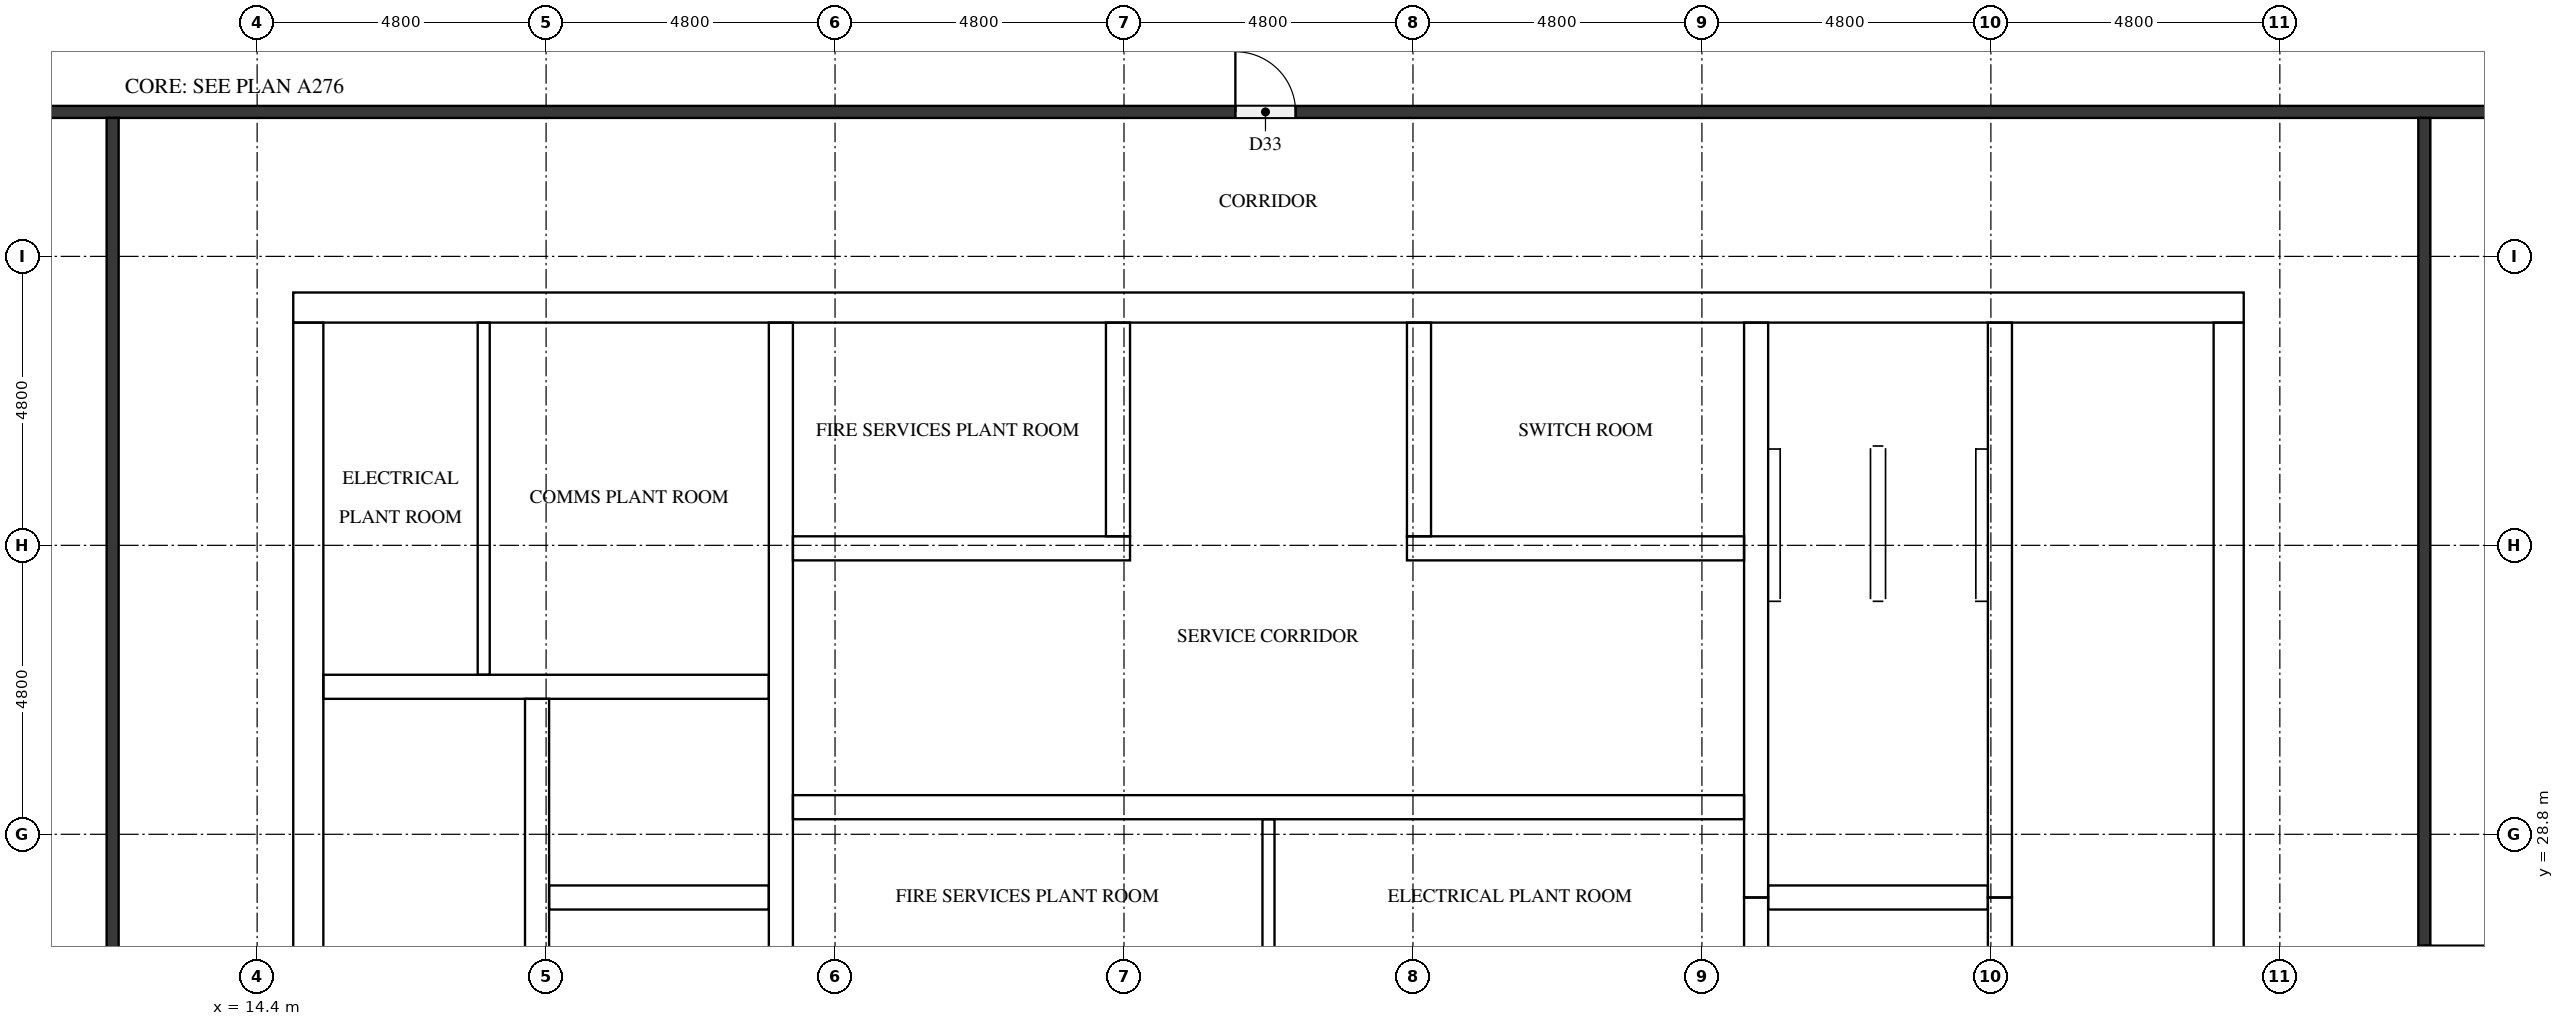
"""IFC4 building model, lengths in metres.
Left out: names, types, materials, properties, quantities, classifications, styles, units other than length and angle.
Written with IfcOpenShell. Run it as: python <this file> out.ifc"""

import sys

from ifc_helpers import new_model, si_unit, direction, frame, frame_2d, origin, place, context, subcontext, project, spatial, rectangle, extrude, element, fill, save


model = new_model("IFC4")
c1 = context("Model", 3, precision=1e-05, world=origin(), true_north=direction((0.0, 1.0)))
c2 = subcontext(c1, "Body", "Model", "MODEL_VIEW")
j1 = project(units=[si_unit("LENGTHUNIT", "METRE"), si_unit("PLANEANGLEUNIT", "RADIAN")], contexts=[c1])
p1 = place(None, origin())
s1 = spatial("IfcSite", under=j1, at=p1, CompositionType="ELEMENT")
p2 = place(p1, origin())
s2 = spatial("IfcBuilding", under=s1, at=p2, CompositionType="ELEMENT")
p3 = place(p2, frame((0.0, 0.0, 314.3)))
s3 = spatial("IfcBuildingStorey", under=s2, at=p3, CompositionType="ELEMENT", Elevation=314.3)
p4 = place(p3, frame((15.0, 37.55, 0.0), z_axis=(0.0, 0.0, 1.0), x_axis=(1.0, 0.0, 0.0)))
e1 = element("IfcWall", 1, at=p4, inside=s3, PredefinedType="SHEAR", context=c2, shape_type="SweptSolid", body=[
    extrude(rectangle(XDim=32.4, YDim=0.5, at=frame_2d((16.2, 0.0))), origin(), (0.0, 0.0, 1.0), 2.6),
])
p5 = place(p4, frame((15.3, 0.0, 0.0)))
e2 = element("IfcOpeningElement", 2, at=p5, cuts=e1, PredefinedType="OPENING", context=c2, shape_type="SweptSolid", body=[
    extrude(rectangle(XDim=1.8, YDim=2.1, at=frame_2d((0.9, 1.05))), frame((0.0, 0.26, 0.0), z_axis=(0.0, -1.0, 0.0), x_axis=(1.0, 0.0, 0.0)), (0.0, 0.0, 1.0), 0.52),
])
p6 = place(p4, frame((1.282, 0.0, 0.0)))
e3 = element("IfcOpeningElement", 3, at=p6, cuts=e1, PredefinedType="OPENING", context=c2, shape_type="SweptSolid", body=[
    extrude(rectangle(XDim=1.0, YDim=2.1, at=frame_2d((0.5, 1.05))), frame((0.0, 0.26, 0.0), z_axis=(0.0, -1.0, 0.0), x_axis=(1.0, 0.0, 0.0)), (0.0, 0.0, 1.0), 0.52),
])
p7 = place(p4, frame((5.082, 0.0, 0.0)))
e4 = element("IfcOpeningElement", 4, at=p7, cuts=e1, PredefinedType="OPENING", context=c2, shape_type="SweptSolid", body=[
    extrude(rectangle(XDim=1.0, YDim=2.1, at=frame_2d((0.5, 1.05))), frame((0.0, 0.26, 0.0), z_axis=(0.0, -1.0, 0.0), x_axis=(1.0, 0.0, 0.0)), (0.0, 0.0, 1.0), 0.52),
])
p8 = place(p3, frame((15.25, 15.5, 0.0), z_axis=(0.0, 0.0, 1.0), x_axis=(0.0, 1.0, 0.0)))
e5 = element("IfcWall", 5, at=p8, inside=s3, PredefinedType="SHEAR", context=c2, shape_type="SweptSolid", body=[
    extrude(rectangle(XDim=21.8, YDim=0.5, at=frame_2d((10.9, 0.0))), origin(), (0.0, 0.0, 1.0), 2.6),
])
p9 = place(p8, frame((5.26, 0.0, 0.0)))
e6 = element("IfcOpeningElement", 6, at=p9, cuts=e5, PredefinedType="OPENING", context=c2, shape_type="SweptSolid", body=[
    extrude(rectangle(XDim=1.2, YDim=2.1, at=frame_2d((0.6, 1.05))), frame((0.0, 0.26, 0.0), z_axis=(0.0, -1.0, 0.0), x_axis=(1.0, 0.0, 0.0)), (0.0, 0.0, 1.0), 0.52),
])
p10 = place(p3, frame((47.15, 15.5, 0.0), z_axis=(0.0, 0.0, 1.0), x_axis=(0.0, 1.0, 0.0)))
e7 = element("IfcWall", 7, at=p10, inside=s3, PredefinedType="SHEAR", context=c2, shape_type="SweptSolid", body=[
    extrude(rectangle(XDim=21.8, YDim=0.5, at=frame_2d((10.9, 0.0))), origin(), (0.0, 0.0, 1.0), 2.6),
])
p11 = place(p10, frame((10.6, 0.0, 0.0)))
e8 = element("IfcOpeningElement", 8, at=p11, cuts=e7, PredefinedType="OPENING", context=c2, shape_type="SweptSolid", body=[
    extrude(rectangle(XDim=1.2, YDim=2.1, at=frame_2d((0.6, 1.05))), frame((0.0, 0.26, 0.0), z_axis=(0.0, -1.0, 0.0), x_axis=(1.0, 0.0, 0.0)), (0.0, 0.0, 1.0), 0.52),
])
p12 = place(p3, frame((19.05, 15.5, 0.0), z_axis=(0.0, 0.0, 1.0), x_axis=(0.0, 1.0, 0.0)))
e9 = element("IfcWall", 9, at=p12, inside=s3, PredefinedType="SHEAR", context=c2, shape_type="SweptSolid", body=[
    extrude(rectangle(XDim=15.55, YDim=0.4, at=frame_2d((7.775, 0.0))), origin(), (0.0, 0.0, 1.0), 2.6),
])
p13 = place(p12, frame((9.95, 0.0, 0.0)))
e10 = element("IfcOpeningElement", 10, at=p13, cuts=e9, PredefinedType="OPENING", context=c2, shape_type="SweptSolid", body=[
    extrude(rectangle(XDim=1.1, YDim=2.1, at=frame_2d((0.55, 1.05))), frame((0.0, 0.21, 0.0), z_axis=(0.0, -1.0, 0.0), x_axis=(1.0, 0.0, 0.0)), (0.0, 0.0, 1.0), 0.42),
])
p14 = place(p12, frame((13.45, 0.0, 0.0)))
e11 = element("IfcOpeningElement", 11, at=p14, cuts=e9, PredefinedType="OPENING", context=c2, shape_type="SweptSolid", body=[
    extrude(rectangle(XDim=1.1, YDim=2.1, at=frame_2d((0.55, 1.05))), frame((0.0, 0.21, 0.0), z_axis=(0.0, -1.0, 0.0), x_axis=(1.0, 0.0, 0.0)), (0.0, 0.0, 1.0), 0.42),
])
p15 = place(p12, frame((0.7, 0.0, 0.0)))
e12 = element("IfcOpeningElement", 12, at=p15, cuts=e9, PredefinedType="OPENING", context=c2, shape_type="SweptSolid", body=[
    extrude(rectangle(XDim=1.2, YDim=2.1, at=frame_2d((0.6, 1.05))), frame((0.0, 0.21, 0.0), z_axis=(0.0, -1.0, 0.0), x_axis=(1.0, 0.0, 0.0)), (0.0, 0.0, 1.0), 0.42),
])
p16 = place(p3, frame((23.1, 15.5, 0.0), z_axis=(0.0, 0.0, 1.0), x_axis=(0.0, 1.0, 0.0)))
e13 = element("IfcWall", 13, at=p16, inside=s3, PredefinedType="SHEAR", context=c2, shape_type="SweptSolid", body=[
    extrude(rectangle(XDim=21.8, YDim=0.4, at=frame_2d((10.9, 0.0))), origin(), (0.0, 0.0, 1.0), 2.6),
])
p17 = place(p3, frame((39.3, 24.25, 0.0), z_axis=(0.0, 0.0, 1.0), x_axis=(0.0, 1.0, 0.0)))
e14 = element("IfcWall", 14, at=p17, inside=s3, PredefinedType="SHEAR", context=c2, shape_type="SweptSolid", body=[
    extrude(rectangle(XDim=3.5, YDim=0.4, at=frame_2d((1.75, 0.0))), origin(), (0.0, 0.0, 1.0), 2.6),
])
p18 = place(p3, frame((39.3, 27.75, 0.0), z_axis=(0.0, 0.0, 1.0), x_axis=(0.0, 1.0, 0.0)))
e15 = element("IfcWall", 15, at=p18, inside=s3, PredefinedType="SHEAR", context=c2, shape_type="SweptSolid", body=[
    extrude(rectangle(XDim=9.55, YDim=0.4, at=frame_2d((4.775, 0.0))), origin(), (0.0, 0.0, 1.0), 2.6),
])
p19 = place(p3, frame((43.35, 24.25, 0.0), z_axis=(0.0, 0.0, 1.0), x_axis=(0.0, 1.0, 0.0)))
e16 = element("IfcWall", 16, at=p19, inside=s3, PredefinedType="SHEAR", context=c2, shape_type="SweptSolid", body=[
    extrude(rectangle(XDim=3.5, YDim=0.4, at=frame_2d((1.75, 0.0))), origin(), (0.0, 0.0, 1.0), 2.6),
])
p20 = place(p19, frame((1.2, 0.0, 0.0)))
e17 = element("IfcOpeningElement", 17, at=p20, cuts=e16, PredefinedType="OPENING", context=c2, shape_type="SweptSolid", body=[
    extrude(rectangle(XDim=1.1, YDim=2.1, at=frame_2d((0.55, 1.05))), frame((0.0, 0.21, 0.0), z_axis=(0.0, -1.0, 0.0), x_axis=(1.0, 0.0, 0.0)), (0.0, 0.0, 1.0), 0.42),
])
p21 = place(p3, frame((43.35, 27.75, 0.0), z_axis=(0.0, 0.0, 1.0), x_axis=(0.0, 1.0, 0.0)))
e18 = element("IfcWall", 18, at=p21, inside=s3, PredefinedType="SHEAR", context=c2, shape_type="SweptSolid", body=[
    extrude(rectangle(XDim=9.55, YDim=0.4, at=frame_2d((4.775, 0.0))), origin(), (0.0, 0.0, 1.0), 2.6),
])
p22 = place(p21, frame((7.65, 0.0, 0.0)))
e19 = element("IfcOpeningElement", 19, at=p22, cuts=e18, PredefinedType="OPENING", context=c2, shape_type="SweptSolid", body=[
    extrude(rectangle(XDim=1.2, YDim=2.1, at=frame_2d((0.6, 1.05))), frame((0.0, 0.21, 0.0), z_axis=(0.0, -1.0, 0.0), x_axis=(1.0, 0.0, 0.0)), (0.0, 0.0, 1.0), 0.42),
])
p23 = place(p3, frame((19.25, 27.75, 0.0), z_axis=(0.0, 0.0, 1.0), x_axis=(1.0, 0.0, 0.0)))
e20 = element("IfcWall", 20, at=p23, inside=s3, PredefinedType="SHEAR", context=c2, shape_type="SweptSolid", body=[
    extrude(rectangle(XDim=3.65, YDim=0.4, at=frame_2d((1.825, 0.0))), origin(), (0.0, 0.0, 1.0), 2.6),
])
p24 = place(p3, frame((15.5, 31.25, 0.0), z_axis=(0.0, 0.0, 1.0), x_axis=(1.0, 0.0, 0.0)))
e21 = element("IfcWall", 21, at=p24, inside=s3, PredefinedType="SHEAR", context=c2, shape_type="SweptSolid", body=[
    extrude(rectangle(XDim=7.4, YDim=0.4, at=frame_2d((3.7, 0.0))), origin(), (0.0, 0.0, 1.0), 2.6),
])
p25 = place(p3, frame((39.5, 27.75, 0.0), z_axis=(0.0, 0.0, 1.0), x_axis=(1.0, 0.0, 0.0)))
e22 = element("IfcWall", 22, at=p25, inside=s3, PredefinedType="SHEAR", context=c2, shape_type="SweptSolid", body=[
    extrude(rectangle(XDim=3.65, YDim=0.4, at=frame_2d((1.825, 0.0))), origin(), (0.0, 0.0, 1.0), 2.6),
])
p26 = place(p3, frame((23.3, 29.25, 0.0), z_axis=(0.0, 0.0, 1.0), x_axis=(1.0, 0.0, 0.0)))
e23 = element("IfcWall", 23, at=p26, inside=s3, PredefinedType="SHEAR", context=c2, shape_type="SweptSolid", body=[
    extrude(rectangle(XDim=15.8, YDim=0.4, at=frame_2d((7.9, 0.0))), origin(), (0.0, 0.0, 1.0), 2.6),
])
p27 = place(p26, frame((3.4, 0.0, 0.0)))
e24 = element("IfcOpeningElement", 24, at=p27, cuts=e23, PredefinedType="OPENING", context=c2, shape_type="SweptSolid", body=[
    extrude(rectangle(XDim=1.0, YDim=2.1, at=frame_2d((0.5, 1.05))), frame((0.0, 0.21, 0.0), z_axis=(0.0, -1.0, 0.0), x_axis=(1.0, 0.0, 0.0)), (0.0, 0.0, 1.0), 0.42),
])
p28 = place(p26, frame((11.4, 0.0, 0.0)))
e25 = element("IfcOpeningElement", 25, at=p28, cuts=e23, PredefinedType="OPENING", context=c2, shape_type="SweptSolid", body=[
    extrude(rectangle(XDim=1.0, YDim=2.1, at=frame_2d((0.5, 1.05))), frame((0.0, 0.21, 0.0), z_axis=(0.0, -1.0, 0.0), x_axis=(1.0, 0.0, 0.0)), (0.0, 0.0, 1.0), 0.42),
])
p29 = place(p3, frame((23.3, 33.55, 0.0), z_axis=(0.0, 0.0, 1.0), x_axis=(1.0, 0.0, 0.0)))
e26 = element("IfcWall", 26, at=p29, inside=s3, PredefinedType="SHEAR", context=c2, shape_type="SweptSolid", body=[
    extrude(rectangle(XDim=5.6, YDim=0.4, at=frame_2d((2.8, 0.0))), origin(), (0.0, 0.0, 1.0), 2.6),
])
p30 = place(p29, frame((2.1, 0.0, 0.0)))
e27 = element("IfcOpeningElement", 27, at=p30, cuts=e26, PredefinedType="OPENING", context=c2, shape_type="SweptSolid", body=[
    extrude(rectangle(XDim=1.0, YDim=2.1, at=frame_2d((0.5, 1.05))), frame((0.0, 0.21, 0.0), z_axis=(0.0, -1.0, 0.0), x_axis=(1.0, 0.0, 0.0)), (0.0, 0.0, 1.0), 0.42),
])
p31 = place(p3, frame((33.5, 33.55, 0.0), z_axis=(0.0, 0.0, 1.0), x_axis=(1.0, 0.0, 0.0)))
e28 = element("IfcWall", 28, at=p31, inside=s3, PredefinedType="SHEAR", context=c2, shape_type="SweptSolid", body=[
    extrude(rectangle(XDim=5.6, YDim=0.4, at=frame_2d((2.8, 0.0))), origin(), (0.0, 0.0, 1.0), 2.6),
])
p32 = place(p31, frame((2.5, 0.0, 0.0)))
e29 = element("IfcOpeningElement", 29, at=p32, cuts=e28, PredefinedType="OPENING", context=c2, shape_type="SweptSolid", body=[
    extrude(rectangle(XDim=1.0, YDim=2.1, at=frame_2d((0.5, 1.05))), frame((0.0, 0.21, 0.0), z_axis=(0.0, -1.0, 0.0), x_axis=(1.0, 0.0, 0.0)), (0.0, 0.0, 1.0), 0.42),
])
for number, where, z_axis, x_axis in (
    (30, (28.7, 33.75, 0.0), (0.0, 0.0, 1.0), (0.0, 1.0, 0.0)),
    (31, (33.7, 33.75, 0.0), (0.0, 0.0, 1.0), (0.0, 1.0, 0.0)),
):
    element("IfcWall", number, at=place(p3, frame(where, z_axis=z_axis, x_axis=x_axis)), inside=s3, PredefinedType="SHEAR", context=c2, shape_type="SweptSolid", body=[
        extrude(rectangle(XDim=3.55, YDim=0.4, at=frame_2d((1.775, 0.0))), origin(), (0.0, 0.0, 1.0), 2.6),
    ])
p33 = place(p3, frame((18.164, 31.45, 0.0), z_axis=(0.0, 0.0, 1.0), x_axis=(0.0, 1.0, 0.0)))
e32 = element("IfcWall", 32, at=p33, inside=s3, PredefinedType="PARTITIONING", context=c2, shape_type="SweptSolid", body=[
    extrude(rectangle(XDim=5.85, YDim=0.2, at=frame_2d((2.925, 0.0))), origin(), (0.0, 0.0, 1.0), 2.6),
])
p34 = place(p3, frame((31.2, 26.35, 0.0), z_axis=(0.0, 0.0, 1.0), x_axis=(0.0, 1.0, 0.0)))
e33 = element("IfcWall", 33, at=p34, inside=s3, PredefinedType="PARTITIONING", context=c2, shape_type="SweptSolid", body=[
    extrude(rectangle(XDim=2.7, YDim=0.2, at=frame_2d((1.35, 0.0))), origin(), (0.0, 0.0, 1.0), 2.6),
])
p35 = place(p3, frame((1.3, 40.8, 0.0), z_axis=(0.0, 0.0, 1.0), x_axis=(1.0, 0.0, 0.0)))
e34 = element("IfcWall", 34, at=p35, inside=s3, PredefinedType="PARTITIONING", context=c2, shape_type="SweptSolid", body=[
    extrude(rectangle(XDim=55.0, YDim=0.2, at=frame_2d((27.5, 0.0))), origin(), (0.0, 0.0, 1.0), 2.6),
])
p36 = place(p35, frame((29.35, 0.0, 0.0)))
e35 = element("IfcOpeningElement", 35, at=p36, cuts=e34, PredefinedType="OPENING", context=c2, shape_type="SweptSolid", body=[
    extrude(rectangle(XDim=1.0, YDim=2.1, at=frame_2d((0.5, 1.05))), frame((0.0, 0.11, 0.0), z_axis=(0.0, -1.0, 0.0), x_axis=(1.0, 0.0, 0.0)), (0.0, 0.0, 1.0), 0.22),
])
p37 = place(p3, frame((12.0, 12.1, 0.0), z_axis=(0.0, 0.0, 1.0), x_axis=(0.0, 1.0, 0.0)))
e36 = element("IfcWall", 36, at=p37, inside=s3, PredefinedType="PARTITIONING", context=c2, shape_type="SweptSolid", body=[
    extrude(rectangle(XDim=28.6, YDim=0.2, at=frame_2d((14.3, 0.0))), origin(), (0.0, 0.0, 1.0), 2.6),
])
p38 = place(p37, frame((13.75, 0.0, 0.0)))
e37 = element("IfcOpeningElement", 37, at=p38, cuts=e36, PredefinedType="OPENING", context=c2, shape_type="SweptSolid", body=[
    extrude(rectangle(XDim=1.0, YDim=2.1, at=frame_2d((0.5, 1.05))), frame((0.0, 0.11, 0.0), z_axis=(0.0, -1.0, 0.0), x_axis=(1.0, 0.0, 0.0)), (0.0, 0.0, 1.0), 0.22),
])
p39 = place(p3, frame((50.4, 40.7, 0.0), z_axis=(0.0, 0.0, 1.0), x_axis=(0.0, -1.0, 0.0)))
e38 = element("IfcWall", 38, at=p39, inside=s3, PredefinedType="PARTITIONING", context=c2, shape_type="SweptSolid", body=[
    extrude(rectangle(XDim=28.6, YDim=0.2, at=frame_2d((14.3, 0.0))), origin(), (0.0, 0.0, 1.0), 2.6),
])
p40 = place(p39, frame((13.75, 0.0, 0.0)))
e39 = element("IfcOpeningElement", 39, at=p40, cuts=e38, PredefinedType="OPENING", context=c2, shape_type="SweptSolid", body=[
    extrude(rectangle(XDim=1.0, YDim=2.1, at=frame_2d((0.5, 1.05))), frame((0.0, 0.11, 0.0), z_axis=(0.0, -1.0, 0.0), x_axis=(1.0, 0.0, 0.0)), (0.0, 0.0, 1.0), 0.22),
])
p41 = place(p14, origin())
e40 = element("IfcDoor", 40, at=p41, inside=s3, OperationType="DOUBLE_DOOR_SLIDING", PredefinedType="DOOR", context=c2, shape_type="SweptSolid", body=[
    extrude(rectangle(XDim=1.1, YDim=2.1, at=frame_2d((0.55, 1.05))), frame((0.0, 0.025, 0.0), z_axis=(0.0, -1.0, 0.0), x_axis=(1.0, 0.0, 0.0)), (0.0, 0.0, 1.0), 0.05),
])
fill(e11, e40)
p42 = place(p22, origin())
e41 = element("IfcDoor", 41, at=p42, inside=s3, OperationType="SINGLE_SWING_LEFT", PredefinedType="DOOR", context=c2, shape_type="SweptSolid", body=[
    extrude(rectangle(XDim=1.2, YDim=2.1, at=frame_2d((0.6, 1.05))), frame((0.0, 0.025, 0.0), z_axis=(0.0, -1.0, 0.0), x_axis=(1.0, 0.0, 0.0)), (0.0, 0.0, 1.0), 0.05),
])
fill(e19, e41)
p43 = place(p5, origin())
e42 = element("IfcDoor", 42, at=p43, inside=s3, OperationType="DOUBLE_DOOR_SINGLE_SWING", PredefinedType="DOOR", context=c2, shape_type="SweptSolid", body=[
    extrude(rectangle(XDim=1.8, YDim=2.1, at=frame_2d((0.9, 1.05))), frame((0.0, 0.025, 0.0), z_axis=(0.0, -1.0, 0.0), x_axis=(1.0, 0.0, 0.0)), (0.0, 0.0, 1.0), 0.05),
])
fill(e2, e42)
p44 = place(p11, origin())
e43 = element("IfcDoor", 43, at=p44, inside=s3, OperationType="SINGLE_SWING_LEFT", PredefinedType="DOOR", context=c2, shape_type="SweptSolid", body=[
    extrude(rectangle(XDim=1.2, YDim=2.1, at=frame_2d((0.6, 1.05))), frame((0.0, 0.025, 0.0), z_axis=(0.0, -1.0, 0.0), x_axis=(1.0, 0.0, 0.0)), (0.0, 0.0, 1.0), 0.05),
])
fill(e8, e43)
p45 = place(p6, origin())
e44 = element("IfcDoor", 44, at=p45, inside=s3, OperationType="SINGLE_SWING_RIGHT", PredefinedType="DOOR", context=c2, shape_type="SweptSolid", body=[
    extrude(rectangle(XDim=1.0, YDim=2.1, at=frame_2d((0.5, 1.05))), frame((0.0, 0.025, 0.0), z_axis=(0.0, -1.0, 0.0), x_axis=(1.0, 0.0, 0.0)), (0.0, 0.0, 1.0), 0.05),
])
fill(e3, e44)
p46 = place(p7, origin())
e45 = element("IfcDoor", 45, at=p46, inside=s3, OperationType="SINGLE_SWING_LEFT", PredefinedType="DOOR", context=c2, shape_type="SweptSolid", body=[
    extrude(rectangle(XDim=1.0, YDim=2.1, at=frame_2d((0.5, 1.05))), frame((0.0, 0.025, 0.0), z_axis=(0.0, -1.0, 0.0), x_axis=(1.0, 0.0, 0.0)), (0.0, 0.0, 1.0), 0.05),
])
fill(e4, e45)
p47 = place(p27, origin())
e46 = element("IfcDoor", 46, at=p47, inside=s3, OperationType="SINGLE_SWING_RIGHT", PredefinedType="DOOR", context=c2, shape_type="SweptSolid", body=[
    extrude(rectangle(XDim=1.0, YDim=2.1, at=frame_2d((0.5, 1.05))), frame((0.0, 0.025, 0.0), z_axis=(0.0, -1.0, 0.0), x_axis=(1.0, 0.0, 0.0)), (0.0, 0.0, 1.0), 0.05),
])
fill(e24, e46)
p48 = place(p28, origin())
e47 = element("IfcDoor", 47, at=p48, inside=s3, OperationType="SINGLE_SWING_LEFT", PredefinedType="DOOR", context=c2, shape_type="SweptSolid", body=[
    extrude(rectangle(XDim=1.0, YDim=2.1, at=frame_2d((0.5, 1.05))), frame((0.0, 0.025, 0.0), z_axis=(0.0, -1.0, 0.0), x_axis=(1.0, 0.0, 0.0)), (0.0, 0.0, 1.0), 0.05),
])
fill(e25, e47)
p49 = place(p30, frame((1.0, 0.0, 0.0), z_axis=(0.0, 0.0, 1.0), x_axis=(-1.0, 0.0, 0.0)))
e48 = element("IfcDoor", 48, at=p49, inside=s3, OperationType="SINGLE_SWING_RIGHT", PredefinedType="DOOR", context=c2, shape_type="SweptSolid", body=[
    extrude(rectangle(XDim=1.0, YDim=2.1, at=frame_2d((0.5, 1.05))), frame((0.0, 0.025, 0.0), z_axis=(0.0, -1.0, 0.0), x_axis=(1.0, 0.0, 0.0)), (0.0, 0.0, 1.0), 0.05),
])
fill(e27, e48)
p50 = place(p32, frame((1.0, 0.0, 0.0), z_axis=(0.0, 0.0, 1.0), x_axis=(-1.0, 0.0, 0.0)))
e49 = element("IfcDoor", 49, at=p50, inside=s3, OperationType="SINGLE_SWING_LEFT", PredefinedType="DOOR", context=c2, shape_type="SweptSolid", body=[
    extrude(rectangle(XDim=1.0, YDim=2.1, at=frame_2d((0.5, 1.05))), frame((0.0, 0.025, 0.0), z_axis=(0.0, -1.0, 0.0), x_axis=(1.0, 0.0, 0.0)), (0.0, 0.0, 1.0), 0.05),
])
fill(e29, e49)
p51 = place(p36, origin())
e50 = element("IfcDoor", 50, at=p51, inside=s3, OperationType="SINGLE_SWING_LEFT", PredefinedType="DOOR", context=c2, shape_type="SweptSolid", body=[
    extrude(rectangle(XDim=1.0, YDim=2.1, at=frame_2d((0.5, 1.05))), frame((0.0, 0.025, 0.0), z_axis=(0.0, -1.0, 0.0), x_axis=(1.0, 0.0, 0.0)), (0.0, 0.0, 1.0), 0.05),
])
fill(e35, e50)
save(model, sys.argv[1])
